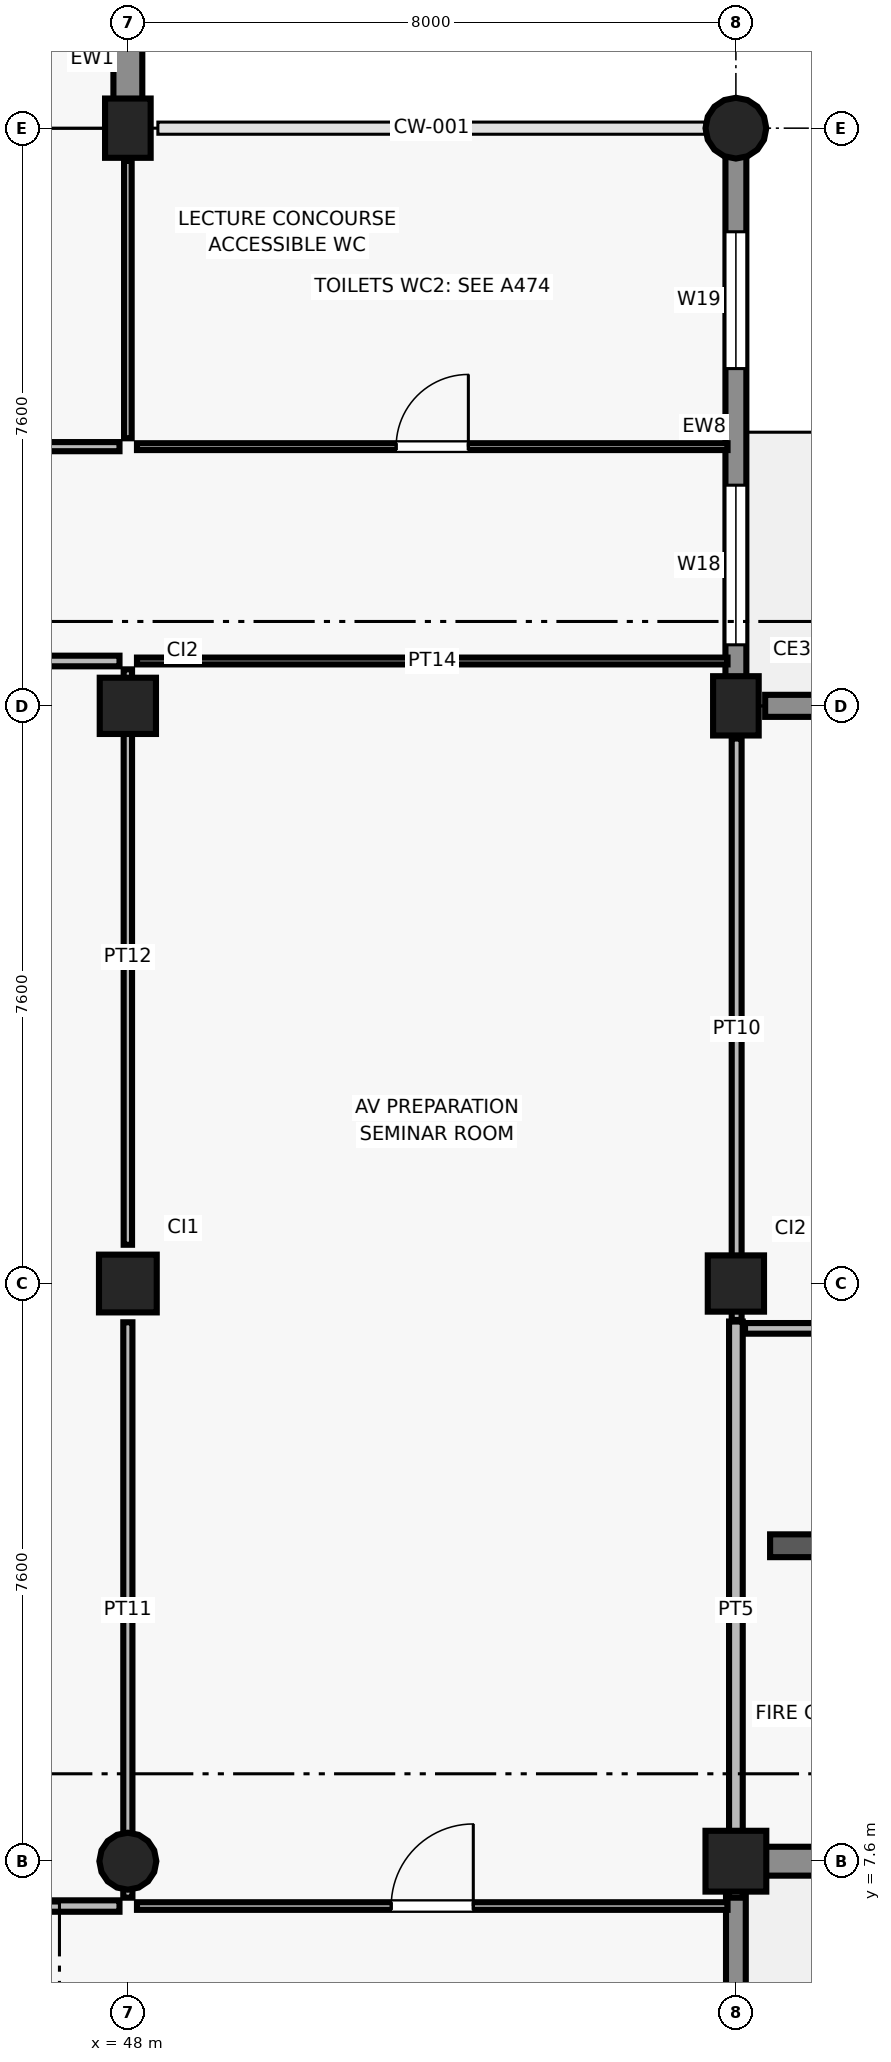
"""IFC4 building model, lengths in metres.
Left out: names, types, materials, properties, quantities, classifications, styles, units other than length and angle.
Written with IfcOpenShell. Run it as: python <this file> out.ifc"""

import sys

from ifc_helpers import new_model, si_unit, direction, frame, frame_2d, origin, origin_2d, place, context, subcontext, project, spatial, rectangle, circle, extrude, element, fill, save


model = new_model("IFC4")
c1 = context("Model", 3, precision=1e-05, world=origin(), true_north=direction((0.0, 1.0)))
c2 = subcontext(c1, "Body", "Model", "MODEL_VIEW")
j1 = project(units=[si_unit("LENGTHUNIT", "METRE"), si_unit("PLANEANGLEUNIT", "RADIAN")], contexts=[c1])
p1 = place(None, origin())
s1 = spatial("IfcSite", under=j1, at=p1, CompositionType="ELEMENT")
p2 = place(p1, origin())
s2 = spatial("IfcBuilding", under=s1, at=p2, CompositionType="ELEMENT")
p3 = place(p2, origin())
s3 = spatial("IfcBuildingStorey", under=s2, at=p3, CompositionType="ELEMENT", Elevation=0.0)
p4 = place(p3, frame((48.0, 7.6, 0.0), z_axis=(0.0, 0.0, 1.0), x_axis=(1.0, 0.0, 0.0)))
e1 = element("IfcColumn", 1, at=p4, inside=s3, PredefinedType="COLUMN", context=c2, shape_type="SweptSolid", body=[
    extrude(circle(Radius=0.375, at=origin_2d()), origin(), (0.0, 0.0, 1.0), 4.5),
])
p5 = place(p3, frame((48.0, 15.2, 0.0), z_axis=(0.0, 0.0, 1.0), x_axis=(1.0, 0.0, 0.0)))
e2 = element("IfcColumn", 2, at=p5, inside=s3, PredefinedType="COLUMN", context=c2, shape_type="SweptSolid", body=[
    extrude(rectangle(XDim=0.76, YDim=0.76, at=origin_2d()), origin(), (0.0, 0.0, 1.0), 4.5),
])
p6 = place(p3, frame((48.0, 22.8, 0.0), z_axis=(0.0, 0.0, 1.0), x_axis=(1.0, 0.0, 0.0)))
e3 = element("IfcColumn", 3, at=p6, inside=s3, PredefinedType="COLUMN", context=c2, shape_type="SweptSolid", body=[
    extrude(rectangle(XDim=0.74, YDim=0.74, at=origin_2d()), origin(), (0.0, 0.0, 1.0), 4.5),
])
p7 = place(p3, frame((48.0, 30.4, 0.0), z_axis=(0.0, 0.0, 1.0), x_axis=(1.0, 0.0, 0.0)))
e4 = element("IfcColumn", 4, at=p7, inside=s3, PredefinedType="COLUMN", context=c2, shape_type="SweptSolid", body=[
    extrude(rectangle(XDim=0.78, YDim=0.6, at=origin_2d()), origin(), (0.0, 0.0, 1.0), 4.5),
])
p8 = place(p3, frame((56.0, 7.6, 0.0), z_axis=(0.0, 0.0, 1.0), x_axis=(1.0, 0.0, 0.0)))
e5 = element("IfcColumn", 5, at=p8, inside=s3, PredefinedType="COLUMN", context=c2, shape_type="SweptSolid", body=[
    extrude(rectangle(XDim=0.8, YDim=0.8, at=origin_2d()), origin(), (0.0, 0.0, 1.0), 4.5),
])
p9 = place(p3, frame((56.0, 15.2, 0.0), z_axis=(0.0, 0.0, 1.0), x_axis=(1.0, 0.0, 0.0)))
e6 = element("IfcColumn", 6, at=p9, inside=s3, PredefinedType="COLUMN", context=c2, shape_type="SweptSolid", body=[
    extrude(rectangle(XDim=0.74, YDim=0.74, at=origin_2d()), origin(), (0.0, 0.0, 1.0), 4.5),
])
p10 = place(p3, frame((56.0, 22.8, 0.0), z_axis=(0.0, 0.0, 1.0), x_axis=(1.0, 0.0, 0.0)))
e7 = element("IfcColumn", 7, at=p10, inside=s3, PredefinedType="COLUMN", context=c2, shape_type="SweptSolid", body=[
    extrude(rectangle(XDim=0.78, YDim=0.6, at=origin_2d()), origin(), (0.0, 0.0, 1.0), 4.5),
])
p11 = place(p3, frame((56.0, 30.4, 0.0), z_axis=(0.0, 0.0, 1.0), x_axis=(1.0, 0.0, 0.0)))
e8 = element("IfcColumn", 8, at=p11, inside=s3, PredefinedType="COLUMN", context=c2, shape_type="SweptSolid", body=[
    extrude(circle(Radius=0.4, at=origin_2d()), origin(), (0.0, 0.0, 1.0), 4.5),
])
p12 = place(p3, frame((56.0, 0.336, 0.0), z_axis=(0.0, 0.0, 1.0), x_axis=(0.0, 1.0, 0.0)))
e9 = element("IfcWall", 9, at=p12, inside=s3, PredefinedType="SOLIDWALL", context=c2, shape_type="SweptSolid", body=[
    extrude(rectangle(XDim=6.869, YDim=0.26, at=frame_2d((3.435, 0.0))), origin(), (0.0, 0.0, 1.0), 4.22),
])
p13 = place(p3, frame((56.395, 7.6, 0.0), z_axis=(0.0, 0.0, 1.0), x_axis=(1.0, 0.0, 0.0)))
e10 = element("IfcWall", 10, at=p13, inside=s3, PredefinedType="SOLIDWALL", context=c2, shape_type="SweptSolid", body=[
    extrude(rectangle(XDim=7.21, YDim=0.38, at=frame_2d((3.605, 0.0))), origin(), (0.0, 0.0, 1.0), 3.54),
])
p14 = place(p13, frame((2.93, 0.0, 0.0)))
e11 = element("IfcOpeningElement", 11, at=p14, cuts=e10, PredefinedType="OPENING", context=c2, shape_type="SweptSolid", body=[
    extrude(rectangle(XDim=1.35, YDim=2.2, at=frame_2d((0.675, 1.1))), frame((0.0, 0.2, 0.0), z_axis=(0.0, -1.0, 0.0), x_axis=(1.0, 0.0, 0.0)), (0.0, 0.0, 1.0), 0.4),
])
p15 = place(p3, frame((63.664, 22.8, 0.0), z_axis=(0.0, 0.0, 1.0), x_axis=(-1.0, 0.0, 0.0)))
e12 = element("IfcWall", 12, at=p15, inside=s3, PredefinedType="SOLIDWALL", context=c2, shape_type="SweptSolid", body=[
    extrude(rectangle(XDim=7.279, YDim=0.29, at=frame_2d((3.64, 0.0))), origin(), (0.0, 0.0, 1.0), 3.62),
])
p16 = place(p15, frame((2.59, 0.0, 0.0)))
e13 = element("IfcOpeningElement", 13, at=p16, cuts=e12, PredefinedType="OPENING", context=c2, shape_type="SweptSolid", body=[
    extrude(rectangle(XDim=2.1, YDim=2.4, at=frame_2d((1.05, 1.2))), frame((0.0, 0.155, 0.0), z_axis=(0.0, -1.0, 0.0), x_axis=(1.0, 0.0, 0.0)), (0.0, 0.0, 1.0), 0.31),
])
p17 = place(p3, frame((56.0, 23.095, 0.0), z_axis=(0.0, 0.0, 1.0), x_axis=(0.0, 1.0, 0.0)))
e14 = element("IfcWall", 14, at=p17, inside=s3, PredefinedType="SOLIDWALL", context=c2, shape_type="SweptSolid", body=[
    extrude(rectangle(XDim=6.969, YDim=0.275, at=frame_2d((3.484, 0.0))), origin(), (0.0, 0.0, 1.0), 3.7),
])
p18 = place(p17, frame((0.508, 0.0, 0.9)))
e15 = element("IfcOpeningElement", 15, at=p18, cuts=e14, PredefinedType="OPENING", context=c2, shape_type="SweptSolid", body=[
    extrude(rectangle(XDim=2.1, YDim=1.25, at=frame_2d((1.05, 0.625))), frame((0.0, 0.147, 0.0), z_axis=(0.0, -1.0, 0.0), x_axis=(1.0, 0.0, 0.0)), (0.0, 0.0, 1.0), 0.295),
])
p19 = place(p17, frame((4.142, 0.0, 0.9)))
e16 = element("IfcOpeningElement", 16, at=p19, cuts=e14, PredefinedType="OPENING", context=c2, shape_type="SweptSolid", body=[
    extrude(rectangle(XDim=1.8, YDim=1.25, at=frame_2d((0.9, 0.625))), frame((0.0, 0.147, 0.0), z_axis=(0.0, -1.0, 0.0), x_axis=(1.0, 0.0, 0.0)), (0.0, 0.0, 1.0), 0.295),
])
p20 = place(p3, frame((48.0, 30.695, 0.0), z_axis=(0.0, 0.0, 1.0), x_axis=(0.0, 1.0, 0.0)))
e17 = element("IfcWall", 17, at=p20, inside=s3, PredefinedType="SOLIDWALL", context=c2, shape_type="SweptSolid", body=[
    extrude(rectangle(XDim=7.11, YDim=0.38, at=frame_2d((3.555, 0.0))), origin(), (0.0, 0.0, 1.0), 3.78),
])
p21 = place(p20, frame((1.477, 0.0, 0.9)))
e18 = element("IfcOpeningElement", 18, at=p21, cuts=e17, PredefinedType="OPENING", context=c2, shape_type="SweptSolid", body=[
    extrude(rectangle(XDim=1.5, YDim=1.25, at=frame_2d((0.75, 0.625))), frame((0.0, 0.2, 0.0), z_axis=(0.0, -1.0, 0.0), x_axis=(1.0, 0.0, 0.0)), (0.0, 0.0, 1.0), 0.4),
])
p22 = place(p20, frame((4.133, 0.0, 0.9)))
e19 = element("IfcOpeningElement", 19, at=p22, cuts=e17, PredefinedType="OPENING", context=c2, shape_type="SweptSolid", body=[
    extrude(rectangle(XDim=1.5, YDim=1.25, at=frame_2d((0.75, 0.625))), frame((0.0, 0.2, 0.0), z_axis=(0.0, -1.0, 0.0), x_axis=(1.0, 0.0, 0.0)), (0.0, 0.0, 1.0), 0.4),
])
p23 = place(p3, frame((56.45, 11.75, 0.0), z_axis=(0.0, 0.0, 1.0), x_axis=(1.0, 0.0, 0.0)))
e20 = element("IfcWall", 20, at=p23, inside=s3, PredefinedType="SHEAR", context=c2, shape_type="SweptSolid", body=[
    extrude(rectangle(XDim=6.3, YDim=0.3, at=frame_2d((3.15, 0.0))), origin(), (0.0, 0.0, 1.0), 4.22),
])
p24 = place(p23, frame((2.4, 0.0, 0.0)))
e21 = element("IfcOpeningElement", 21, at=p24, cuts=e20, PredefinedType="OPENING", context=c2, shape_type="SweptSolid", body=[
    extrude(rectangle(XDim=1.2, YDim=2.2, at=frame_2d((0.6, 1.1))), frame((0.0, 0.16, 0.0), z_axis=(0.0, -1.0, 0.0), x_axis=(1.0, 0.0, 0.0)), (0.0, 0.0, 1.0), 0.32),
])
p25 = place(p3, frame((38.42, 7.01, 0.0), z_axis=(0.0, 0.0, 1.0), x_axis=(1.0, 0.0, 0.0)))
e22 = element("IfcWall", 22, at=p25, inside=s3, PredefinedType="PARTITIONING", context=c2, shape_type="SweptSolid", body=[
    extrude(rectangle(XDim=9.47, YDim=0.15, at=frame_2d((4.735, 0.0))), origin(), (0.0, 0.0, 1.0), 4.2),
])
p26 = place(p25, frame((3.885, 0.0, 0.0)))
e23 = element("IfcOpeningElement", 23, at=p26, cuts=e22, PredefinedType="OPENING", context=c2, shape_type="SweptSolid", body=[
    extrude(rectangle(XDim=1.7, YDim=2.3, at=frame_2d((0.85, 1.15))), frame((0.0, 0.085, 0.0), z_axis=(0.0, -1.0, 0.0), x_axis=(1.0, 0.0, 0.0)), (0.0, 0.0, 1.0), 0.17),
])
p27 = place(p3, frame((38.42, 23.39, 0.0), z_axis=(0.0, 0.0, 1.0), x_axis=(1.0, 0.0, 0.0)))
e24 = element("IfcWall", 24, at=p27, inside=s3, PredefinedType="PARTITIONING", context=c2, shape_type="SweptSolid", body=[
    extrude(rectangle(XDim=9.47, YDim=0.14, at=frame_2d((4.735, 0.0))), origin(), (0.0, 0.0, 1.0), 4.2),
])
p28 = place(p3, frame((48.0, 7.12, 0.0), z_axis=(0.0, 0.0, 1.0), x_axis=(0.0, 1.0, 0.0)))
e25 = element("IfcWall", 25, at=p28, inside=s3, PredefinedType="PARTITIONING", context=c2, shape_type="SweptSolid", body=[
    extrude(rectangle(XDim=7.57, YDim=0.12, at=frame_2d((3.785, 0.0))), origin(), (0.0, 0.0, 1.0), 3.6),
])
p29 = place(p3, frame((48.0, 15.71, 0.0), z_axis=(0.0, 0.0, 1.0), x_axis=(0.0, 1.0, 0.0)))
e26 = element("IfcWall", 26, at=p29, inside=s3, PredefinedType="PARTITIONING", context=c2, shape_type="SweptSolid", body=[
    extrude(rectangle(XDim=7.57, YDim=0.11, at=frame_2d((3.785, 0.0))), origin(), (0.0, 0.0, 1.0), 3.64),
])
p30 = place(p3, frame((48.12, 7.01, 0.0), z_axis=(0.0, 0.0, 1.0), x_axis=(1.0, 0.0, 0.0)))
e27 = element("IfcWall", 27, at=p30, inside=s3, PredefinedType="PARTITIONING", context=c2, shape_type="SweptSolid", body=[
    extrude(rectangle(XDim=7.77, YDim=0.1, at=frame_2d((3.885, 0.0))), origin(), (0.0, 0.0, 1.0), 4.2),
])
p31 = place(p30, frame((3.345, 0.0, 0.0)))
e28 = element("IfcOpeningElement", 28, at=p31, cuts=e27, PredefinedType="OPENING", context=c2, shape_type="SweptSolid", body=[
    extrude(rectangle(XDim=1.08, YDim=2.15, at=frame_2d((0.54, 1.075))), frame((0.0, 0.06, 0.0), z_axis=(0.0, -1.0, 0.0), x_axis=(1.0, 0.0, 0.0)), (0.0, 0.0, 1.0), 0.12),
])
p32 = place(p3, frame((48.12, 23.39, 0.0), z_axis=(0.0, 0.0, 1.0), x_axis=(1.0, 0.0, 0.0)))
e29 = element("IfcWall", 29, at=p32, inside=s3, PredefinedType="PARTITIONING", context=c2, shape_type="SweptSolid", body=[
    extrude(rectangle(XDim=7.77, YDim=0.09, at=frame_2d((3.885, 0.0))), origin(), (0.0, 0.0, 1.0), 4.2),
])
p33 = place(p3, frame((56.0, 7.12, 0.0), z_axis=(0.0, 0.0, 1.0), x_axis=(0.0, 1.0, 0.0)))
e30 = element("IfcWall", 30, at=p33, inside=s3, PredefinedType="PARTITIONING", context=c2, shape_type="SweptSolid", body=[
    extrude(rectangle(XDim=7.58, YDim=0.18, at=frame_2d((3.79, 0.0))), origin(), (0.0, 0.0, 1.0), 3.6),
])
p34 = place(p3, frame((38.42, 26.21, 0.0), z_axis=(0.0, 0.0, 1.0), x_axis=(1.0, 0.0, 0.0)))
e31 = element("IfcWall", 31, at=p34, inside=s3, PredefinedType="PARTITIONING", context=c2, shape_type="SweptSolid", body=[
    extrude(rectangle(XDim=9.47, YDim=0.12, at=frame_2d((4.735, 0.0))), origin(), (0.0, 0.0, 1.0), 4.2),
])
p35 = place(p34, frame((4.275, 0.0, 0.0)))
e32 = element("IfcOpeningElement", 32, at=p35, cuts=e31, PredefinedType="OPENING", context=c2, shape_type="SweptSolid", body=[
    extrude(rectangle(XDim=0.92, YDim=2.1, at=frame_2d((0.46, 1.05))), frame((0.0, 0.07, 0.0), z_axis=(0.0, -1.0, 0.0), x_axis=(1.0, 0.0, 0.0)), (0.0, 0.0, 1.0), 0.14),
])
p36 = place(p3, frame((48.0, 26.32, 0.0), z_axis=(0.0, 0.0, 1.0), x_axis=(0.0, 1.0, 0.0)))
e33 = element("IfcWall", 33, at=p36, inside=s3, PredefinedType="PARTITIONING", context=c2, shape_type="SweptSolid", body=[
    extrude(rectangle(XDim=3.65, YDim=0.1, at=frame_2d((1.825, 0.0))), origin(), (0.0, 0.0, 1.0), 3.64),
])
p37 = place(p3, frame((48.12, 26.21, 0.0), z_axis=(0.0, 0.0, 1.0), x_axis=(1.0, 0.0, 0.0)))
e34 = element("IfcWall", 34, at=p37, inside=s3, PredefinedType="PARTITIONING", context=c2, shape_type="SweptSolid", body=[
    extrude(rectangle(XDim=7.77, YDim=0.09, at=frame_2d((3.885, 0.0))), origin(), (0.0, 0.0, 1.0), 4.2),
])
p38 = place(p37, frame((3.41, 0.0, 0.0)))
e35 = element("IfcOpeningElement", 35, at=p38, cuts=e34, PredefinedType="OPENING", context=c2, shape_type="SweptSolid", body=[
    extrude(rectangle(XDim=0.95, YDim=2.1, at=frame_2d((0.475, 1.05))), frame((0.0, 0.055, 0.0), z_axis=(0.0, -1.0, 0.0), x_axis=(1.0, 0.0, 0.0)), (0.0, 0.0, 1.0), 0.11),
])
p39 = place(p3, frame((56.12, 14.61, 0.0), z_axis=(0.0, 0.0, 1.0), x_axis=(1.0, 0.0, 0.0)))
e36 = element("IfcWall", 36, at=p39, inside=s3, PredefinedType="PARTITIONING", context=c2, shape_type="SweptSolid", body=[
    extrude(rectangle(XDim=27.77, YDim=0.14, at=frame_2d((13.885, 0.0))), origin(), (0.0, 0.0, 1.0), 4.2),
])
p40 = place(p39, frame((13.385, 0.0, 0.0)))
e37 = element("IfcOpeningElement", 37, at=p40, cuts=e36, PredefinedType="OPENING", context=c2, shape_type="SweptSolid", body=[
    extrude(rectangle(XDim=1.0, YDim=2.15, at=frame_2d((0.5, 1.075))), frame((0.0, 0.08, 0.0), z_axis=(0.0, -1.0, 0.0), x_axis=(1.0, 0.0, 0.0)), (0.0, 0.0, 1.0), 0.16),
])
p41 = place(p3, frame((56.01, 14.72, 0.0), z_axis=(0.0, 0.0, 1.0), x_axis=(0.0, 1.0, 0.0)))
e38 = element("IfcWall", 38, at=p41, inside=s3, PredefinedType="PARTITIONING", context=c2, shape_type="SweptSolid", body=[
    extrude(rectangle(XDim=7.65, YDim=0.13, at=frame_2d((3.825, 0.0))), origin(), (0.0, 0.0, 1.0), 3.64),
])
p42 = place(p18, origin())
e39 = element("IfcWindow", 39, at=p42, inside=s3, PartitioningType="SINGLE_PANEL", PredefinedType="WINDOW", context=c2, shape_type="SweptSolid", body=[
    extrude(rectangle(XDim=2.1, YDim=1.25, at=frame_2d((1.05, 0.625))), frame((0.0, 0.03, 0.0), z_axis=(0.0, -1.0, 0.0), x_axis=(1.0, 0.0, 0.0)), (0.0, 0.0, 1.0), 0.06),
])
fill(e15, e39)
p43 = place(p19, origin())
e40 = element("IfcWindow", 40, at=p43, inside=s3, PartitioningType="SINGLE_PANEL", PredefinedType="WINDOW", context=c2, shape_type="SweptSolid", body=[
    extrude(rectangle(XDim=1.8, YDim=1.25, at=frame_2d((0.9, 0.625))), frame((0.0, 0.03, 0.0), z_axis=(0.0, -1.0, 0.0), x_axis=(1.0, 0.0, 0.0)), (0.0, 0.0, 1.0), 0.06),
])
fill(e16, e40)
p44 = place(p31, origin())
e41 = element("IfcDoor", 41, at=p44, inside=s3, OperationType="SINGLE_SWING_RIGHT", PredefinedType="DOOR", context=c2, shape_type="SweptSolid", body=[
    extrude(rectangle(XDim=1.08, YDim=2.15, at=frame_2d((0.54, 1.075))), frame((0.0, 0.025, 0.0), z_axis=(0.0, -1.0, 0.0), x_axis=(1.0, 0.0, 0.0)), (0.0, 0.0, 1.0), 0.05),
])
fill(e28, e41)
p45 = place(p38, origin())
e42 = element("IfcDoor", 42, at=p45, inside=s3, OperationType="SINGLE_SWING_RIGHT", PredefinedType="DOOR", context=c2, shape_type="SweptSolid", body=[
    extrude(rectangle(XDim=0.95, YDim=2.1, at=frame_2d((0.475, 1.05))), frame((0.0, 0.025, 0.0), z_axis=(0.0, -1.0, 0.0), x_axis=(1.0, 0.0, 0.0)), (0.0, 0.0, 1.0), 0.05),
])
fill(e35, e42)
save(model, sys.argv[1])
